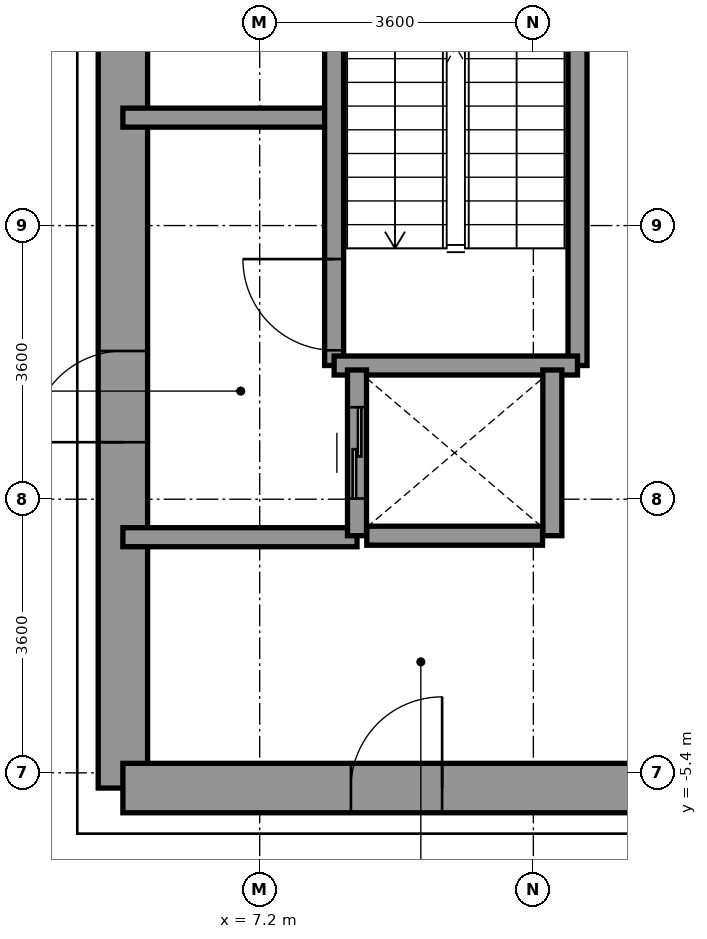
"""IFC4 building model, lengths in metres.
Left out: names, types, materials, properties, quantities, classifications, styles, units other than length and angle.
Written with IfcOpenShell. Run it as: python <this file> out.ifc"""

import sys

from ifc_helpers import new_model, si_unit, direction, frame, frame_2d, origin, place, context, subcontext, project, spatial, rectangle, extrude, source, transform, mapped, element, fill, save


model = new_model("IFC4")
c1 = context("Model", 3, precision=1e-05, world=origin(), true_north=direction((0.0, 1.0)))
c2 = subcontext(c1, "Body", "Model", "MODEL_VIEW")
j1 = project(units=[si_unit("LENGTHUNIT", "METRE"), si_unit("PLANEANGLEUNIT", "RADIAN")], contexts=[c1])
p1 = place(None, origin())
s1 = spatial("IfcSite", under=j1, at=p1, CompositionType="ELEMENT")
p2 = place(p1, origin())
s2 = spatial("IfcBuilding", under=s1, at=p2, CompositionType="ELEMENT")
p3 = place(p2, frame((0.0, 0.0, -4.2)))
s3 = spatial("IfcBuildingStorey", under=s2, at=p3, CompositionType="ELEMENT", Elevation=-4.2)
p4 = place(p3, frame((5.4, -5.6, 0.0), z_axis=(0.0, 0.0, 1.0), x_axis=(0.0, 1.0, 0.0)))
e1 = element("IfcWall", 1, at=p4, inside=s3, PredefinedType="SHEAR", context=c2, shape_type="SweptSolid", body=[
    extrude(rectangle(XDim=12.5, YDim=0.65, at=frame_2d((6.25, 0.0))), origin(), (0.0, 0.0, 1.0), 3.95),
])
p5 = place(p4, frame((4.55, 0.0, 0.0)))
e2 = element("IfcOpeningElement", 2, at=p5, cuts=e1, PredefinedType="OPENING", context=c2, shape_type="SweptSolid", body=[
    extrude(rectangle(XDim=1.2, YDim=2.2, at=frame_2d((0.6, 1.1))), frame((0.0, 0.335, 0.0), z_axis=(0.0, -1.0, 0.0), x_axis=(1.0, 0.0, 0.0)), (0.0, 0.0, 1.0), 0.67),
])
p6 = place(p3, frame((5.4, -5.6, 0.0), z_axis=(0.0, 0.0, 1.0), x_axis=(1.0, 0.0, 0.0)))
e3 = element("IfcWall", 3, at=p6, inside=s3, PredefinedType="SHEAR", context=c2, shape_type="SweptSolid", body=[
    extrude(rectangle(XDim=7.8, YDim=0.65, at=frame_2d((3.9, 0.0))), origin(), (0.0, 0.0, 1.0), 3.95),
])
p7 = place(p6, frame((3.0, 0.0, 0.0)))
e4 = element("IfcOpeningElement", 4, at=p7, cuts=e3, PredefinedType="OPENING", context=c2, shape_type="SweptSolid", body=[
    extrude(rectangle(XDim=1.2, YDim=2.2, at=frame_2d((0.6, 1.1))), frame((0.0, 0.335, 0.0), z_axis=(0.0, -1.0, 0.0), x_axis=(1.0, 0.0, 0.0)), (0.0, 0.0, 1.0), 0.67),
])
p8 = place(p3, frame((5.4, 3.22, 0.0), z_axis=(0.0, 0.0, 1.0), x_axis=(1.0, 0.0, 0.0)))
e5 = element("IfcWall", 5, at=p8, inside=s3, PredefinedType="SOLIDWALL", context=c2, shape_type="SweptSolid", body=[
    extrude(rectangle(XDim=2.78, YDim=0.25, at=frame_2d((1.39, 0.0))), origin(), (0.0, 0.0, 1.0), 3.95),
])
p9 = place(p3, frame((5.4, -2.3, 0.0), z_axis=(0.0, 0.0, 1.0), x_axis=(1.0, 0.0, 0.0)))
e6 = element("IfcWall", 6, at=p9, inside=s3, PredefinedType="SOLIDWALL", context=c2, shape_type="SweptSolid", body=[
    extrude(rectangle(XDim=3.08, YDim=0.25, at=frame_2d((1.54, 0.0))), origin(), (0.0, 0.0, 1.0), 3.95),
])
p10 = place(p3, frame((8.179, -0.041, 0.0), z_axis=(0.0, 0.0, 1.0), x_axis=(0.0, 1.0, 0.0)))
e7 = element("IfcWall", 7, at=p10, inside=s3, PredefinedType="SOLIDWALL", context=c2, shape_type="SweptSolid", body=[
    extrude(rectangle(XDim=6.941, YDim=0.25, at=frame_2d((3.47, 0.0))), origin(), (0.0, 0.0, 1.0), 3.95),
])
p11 = place(p10, frame((0.2, 0.0, 0.0)))
e8 = element("IfcOpeningElement", 8, at=p11, cuts=e7, PredefinedType="OPENING", context=c2, shape_type="SweptSolid", body=[
    extrude(rectangle(XDim=1.2, YDim=2.2, at=frame_2d((0.6, 1.1))), frame((0.0, 0.135, 0.0), z_axis=(0.0, -1.0, 0.0), x_axis=(1.0, 0.0, 0.0)), (0.0, 0.0, 1.0), 0.27),
])
p12 = place(p3, frame((11.381, -0.041, 0.0), z_axis=(0.0, 0.0, 1.0), x_axis=(0.0, 1.0, 0.0)))
e9 = element("IfcWall", 9, at=p12, inside=s3, PredefinedType="SOLIDWALL", context=c2, shape_type="SweptSolid", body=[
    extrude(rectangle(XDim=6.941, YDim=0.25, at=frame_2d((3.47, 0.0))), origin(), (0.0, 0.0, 1.0), 3.95),
])
p13 = place(p3, frame((8.179, -0.041, 0.0), z_axis=(0.0, 0.0, 1.0), x_axis=(1.0, 0.0, 0.0)))
e10 = element("IfcWall", 10, at=p13, inside=s3, PredefinedType="SOLIDWALL", context=c2, shape_type="SweptSolid", body=[
    extrude(rectangle(XDim=3.202, YDim=0.25, at=frame_2d((1.601, 0.0))), origin(), (0.0, 0.0, 1.0), 3.95),
])
p14 = place(p3, frame((8.48, -2.28, 0.0), z_axis=(0.0, 0.0, 1.0), x_axis=(0.0, 1.0, 0.0)))
e11 = element("IfcWall", 11, at=p14, inside=s3, PredefinedType="SOLIDWALL", context=c2, shape_type="SweptSolid", body=[
    extrude(rectangle(XDim=2.18, YDim=0.25, at=frame_2d((1.09, 0.0))), origin(), (0.0, 0.0, 1.0), 3.95),
])
p15 = place(p14, frame((0.49, 0.0, 0.0)))
e12 = element("IfcOpeningElement", 12, at=p15, cuts=e11, PredefinedType="OPENING", context=c2, shape_type="SweptSolid", body=[
    extrude(rectangle(XDim=1.2, YDim=2.2, at=frame_2d((0.6, 1.1))), frame((0.0, 0.135, 0.0), z_axis=(0.0, -1.0, 0.0), x_axis=(1.0, 0.0, 0.0)), (0.0, 0.0, 1.0), 0.27),
])
p16 = place(p3, frame((11.05, -2.28, 0.0), z_axis=(0.0, 0.0, 1.0), x_axis=(0.0, 1.0, 0.0)))
e13 = element("IfcWall", 13, at=p16, inside=s3, PredefinedType="SOLIDWALL", context=c2, shape_type="SweptSolid", body=[
    extrude(rectangle(XDim=2.18, YDim=0.25, at=frame_2d((1.09, 0.0))), origin(), (0.0, 0.0, 1.0), 3.95),
])
p17 = place(p3, frame((8.609, -2.28, 0.0), z_axis=(0.0, 0.0, 1.0), x_axis=(1.0, 0.0, 0.0)))
e14 = element("IfcWall", 14, at=p17, inside=s3, PredefinedType="SOLIDWALL", context=c2, shape_type="SweptSolid", body=[
    extrude(rectangle(XDim=2.312, YDim=0.25, at=frame_2d((1.156, 0.0))), origin(), (0.0, 0.0, 1.0), 3.95),
])
m1 = source(origin(), c2, "Body", "SweptSolid", [
    extrude(rectangle(XDim=1.2, YDim=2.2, at=frame_2d((0.6, 1.1))), frame((0.0, 0.025, 0.0), z_axis=(0.0, -1.0, 0.0), x_axis=(1.0, 0.0, 0.0)), (0.0, 0.0, 1.0), 0.05),
])
p18 = place(p11, origin())
e15 = element("IfcDoor", 15, at=p18, inside=s3, OperationType="SINGLE_SWING_RIGHT", PredefinedType="DOOR", context=c2, shape_type="MappedRepresentation", body=[
    mapped(m1, transform((0.0, 0.0, 0.0), x_axis=(1.0, 0.0, 0.0), y_axis=(0.0, 1.0, 0.0), z_axis=(0.0, 0.0, 1.0), scale=1.0)),
])
fill(e8, e15)
p19 = place(p5, origin())
e16 = element("IfcDoor", 16, at=p19, inside=s3, OperationType="SINGLE_SWING_LEFT", PredefinedType="DOOR", context=c2, shape_type="MappedRepresentation", body=[
    mapped(m1, transform((0.0, 0.0, 0.0), x_axis=(1.0, 0.0, 0.0), y_axis=(0.0, 1.0, 0.0), z_axis=(0.0, 0.0, 1.0), scale=1.0)),
])
fill(e2, e16)
p20 = place(p7, origin())
e17 = element("IfcDoor", 17, at=p20, inside=s3, OperationType="SINGLE_SWING_RIGHT", PredefinedType="DOOR", context=c2, shape_type="MappedRepresentation", body=[
    mapped(m1, transform((0.0, 0.0, 0.0), x_axis=(1.0, 0.0, 0.0), y_axis=(0.0, 1.0, 0.0), z_axis=(0.0, 0.0, 1.0), scale=1.0)),
])
fill(e4, e17)
p21 = place(p15, origin())
e18 = element("IfcDoor", 18, at=p21, inside=s3, OperationType="SLIDING_TO_RIGHT", PredefinedType="DOOR", context=c2, shape_type="MappedRepresentation", body=[
    mapped(m1, transform((0.0, 0.0, 0.0), x_axis=(1.0, 0.0, 0.0), y_axis=(0.0, 1.0, 0.0), z_axis=(0.0, 0.0, 1.0), scale=1.0)),
])
fill(e12, e18)
save(model, sys.argv[1])
